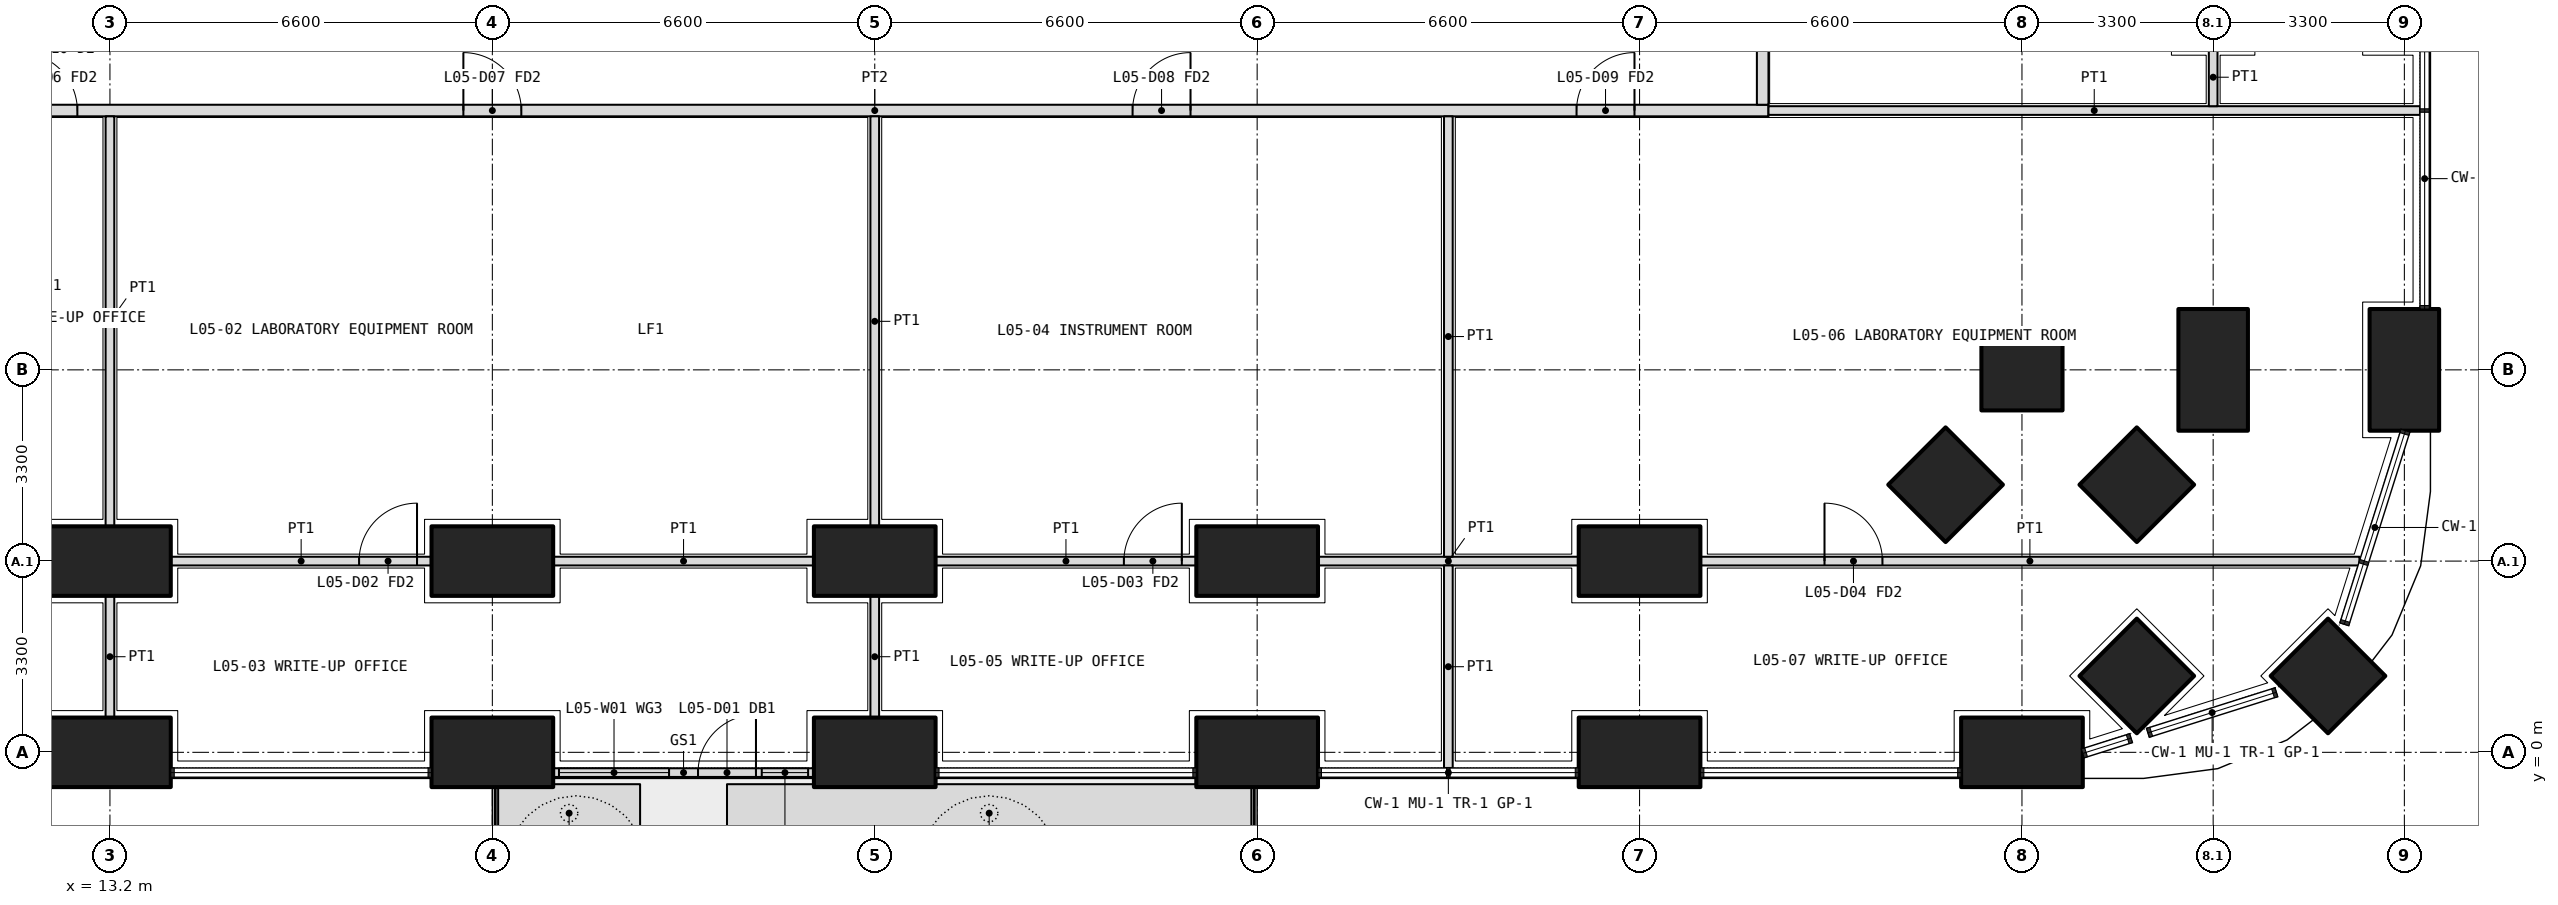
"""IFC4 building model, lengths in metres.
Left out: names, types, materials, properties, quantities, classifications, styles, units other than length and angle.
Written with IfcOpenShell. Run it as: python <this file> out.ifc"""

import sys

from ifc_helpers import new_model, si_unit, direction, frame, frame_2d, origin, origin_2d, place, context, subcontext, project, spatial, polyline, rectangle, outline, extrude, element, fill, save


model = new_model("IFC4")
c1 = context("Model", 3, precision=1e-05, world=origin(), true_north=direction((0.0, 1.0)))
c2 = subcontext(c1, "Body", "Model", "MODEL_VIEW")
j1 = project(units=[si_unit("LENGTHUNIT", "METRE"), si_unit("PLANEANGLEUNIT", "RADIAN")], contexts=[c1])
p1 = place(None, origin())
s1 = spatial("IfcSite", under=j1, at=p1, CompositionType="ELEMENT")
p2 = place(p1, origin())
s2 = spatial("IfcBuilding", under=s1, at=p2, CompositionType="ELEMENT")
p3 = place(p2, frame((0.0, 0.0, 25.5)))
s3 = spatial("IfcBuildingStorey", under=s2, at=p3, CompositionType="ELEMENT", Elevation=25.5)
p4 = place(p3, frame((51.482, 1.318, 0.0), z_axis=(0.0, 0.0, 1.0), x_axis=(0.707106781187, 0.707106781187, 0.0)))
e1 = element("IfcColumn", 1, at=p4, inside=s3, PredefinedType="COLUMN", context=c2, shape_type="SweptSolid", body=[
    extrude(rectangle(XDim=1.4, YDim=1.4, at=origin_2d()), origin(), (0.0, 0.0, 1.0), 4.2),
])
for number, where, z_axis, x_axis in (
    (2, (13.2, 0.0, 0.0), (0.0, 0.0, 1.0), (1.0, 0.0, 0.0)),
    (3, (19.8, 0.0, 0.0), (0.0, 0.0, 1.0), (1.0, 0.0, 0.0)),
    (4, (26.4, 0.0, 0.0), (0.0, 0.0, 1.0), (1.0, 0.0, 0.0)),
    (5, (33.0, 0.0, 0.0), (0.0, 0.0, 1.0), (1.0, 0.0, 0.0)),
    (6, (39.6, 0.0, 0.0), (0.0, 0.0, 1.0), (1.0, 0.0, 0.0)),
    (7, (46.2, 0.0, 0.0), (0.0, 0.0, 1.0), (1.0, 0.0, 0.0)),
    (8, (52.8, 6.6, 0.0), (0.0, 0.0, 1.0), (0.0, 1.0, 0.0)),
):
    element("IfcColumn", number, at=place(p3, frame(where, z_axis=z_axis, x_axis=x_axis)), inside=s3, PredefinedType="COLUMN", context=c2, shape_type="SweptSolid", body=[
        extrude(rectangle(XDim=2.1, YDim=1.2, at=origin_2d()), origin(), (0.0, 0.0, 1.0), 4.2),
    ])
for number, where, z_axis, x_axis in (
    (9, (46.2, 6.6, 0.0), (0.0, 0.0, 1.0), (1.0, 0.0, 0.0)),
    (10, (48.182, 1.318, 0.0), (0.0, 0.0, 1.0), (0.707, 0.707, 0.0)),
):
    element("IfcColumn", number, at=place(p3, frame(where, z_axis=z_axis, x_axis=x_axis)), inside=s3, PredefinedType="COLUMN", context=c2, shape_type="SweptSolid", body=[
        extrude(rectangle(XDim=1.4, YDim=1.4, at=origin_2d()), origin(), (0.0, 0.0, 1.0), 4.2),
    ])
p5 = place(p3, frame((49.5, 6.6, 0.0), z_axis=(0.0, 0.0, 1.0), x_axis=(0.0, 1.0, 0.0)))
e11 = element("IfcColumn", 11, at=p5, inside=s3, PredefinedType="COLUMN", context=c2, shape_type="SweptSolid", body=[
    extrude(rectangle(XDim=2.1, YDim=1.2, at=origin_2d()), origin(), (0.0, 0.0, 1.0), 4.2),
])
p6 = place(p3, frame((48.182, 4.618, 0.0), z_axis=(0.0, 0.0, 1.0), x_axis=(0.707106781187, 0.707106781187, 0.0)))
e12 = element("IfcColumn", 12, at=p6, inside=s3, PredefinedType="COLUMN", context=c2, shape_type="SweptSolid", body=[
    extrude(rectangle(XDim=1.4, YDim=1.4, at=origin_2d()), origin(), (0.0, 0.0, 1.0), 4.2),
])
for number, where, z_axis, x_axis in (
    (13, (13.2, 3.3, 0.0), (0.0, 0.0, 1.0), (1.0, 0.0, 0.0)),
    (14, (19.8, 3.3, 0.0), (0.0, 0.0, 1.0), (1.0, 0.0, 0.0)),
    (15, (26.4, 3.3, 0.0), (0.0, 0.0, 1.0), (1.0, 0.0, 0.0)),
    (16, (33.0, 3.3, 0.0), (0.0, 0.0, 1.0), (1.0, 0.0, 0.0)),
    (17, (39.6, 3.3, 0.0), (0.0, 0.0, 1.0), (1.0, 0.0, 0.0)),
):
    element("IfcColumn", number, at=place(p3, frame(where, z_axis=z_axis, x_axis=x_axis)), inside=s3, PredefinedType="COLUMN", context=c2, shape_type="SweptSolid", body=[
        extrude(rectangle(XDim=2.1, YDim=1.2, at=origin_2d()), origin(), (0.0, 0.0, 1.0), 4.2),
    ])
p7 = place(p3, frame((44.882, 4.618, 0.0), z_axis=(0.0, 0.0, 1.0), x_axis=(0.707106781187, 0.707106781187, 0.0)))
e18 = element("IfcColumn", 18, at=p7, inside=s3, PredefinedType="COLUMN", context=c2, shape_type="SweptSolid", body=[
    extrude(rectangle(XDim=1.4, YDim=1.4, at=origin_2d()), origin(), (0.0, 0.0, 1.0), 4.2),
])
p8 = place(p3, origin())
e19 = element("IfcWall", 19, at=p8, inside=s3, PredefinedType="USERDEFINED", context=c2, shape_type="SweptSolid", body=[
    extrude(outline(polyline([(19.9, -1.55), (22.35, -1.55), (22.35, -0.55), (19.9, -0.55), (19.9, -1.55)]), holes=[polyline([(20.05, -1.4), (22.2, -1.4), (22.2, -0.7), (20.05, -0.7), (20.05, -1.4)])]), origin(), (0.0, 0.0, 1.0), 1.05),
])
p9 = place(p3, origin())
e20 = element("IfcWall", 20, at=p9, inside=s3, PredefinedType="USERDEFINED", context=c2, shape_type="SweptSolid", body=[
    extrude(outline(polyline([(23.85, -1.55), (32.9, -1.55), (32.9, -0.55), (23.85, -0.55), (23.85, -1.55)]), holes=[polyline([(24.0, -1.4), (32.75, -1.4), (32.75, -0.7), (24.0, -0.7), (24.0, -1.4)])]), origin(), (0.0, 0.0, 1.0), 1.05),
])
p10 = place(p3, frame((20.85, -0.35, 0.0), z_axis=(0.0, 0.0, 1.0), x_axis=(1.0, 0.0, 0.0)))
e21 = element("IfcWall", 21, at=p10, inside=s3, PredefinedType="SOLIDWALL", context=c2, shape_type="SweptSolid", body=[
    extrude(rectangle(XDim=4.5, YDim=0.15, at=frame_2d((2.25, 0.0))), origin(), (0.0, 0.0, 1.0), 2.7),
])
p11 = place(p10, frame((2.5, 0.0, 0.0)))
e22 = element("IfcOpeningElement", 22, at=p11, cuts=e21, PredefinedType="OPENING", context=c2, shape_type="SweptSolid", body=[
    extrude(rectangle(XDim=1.0, YDim=2.4, at=frame_2d((0.5, 1.2))), frame((0.0, 0.085, 0.0), z_axis=(0.0, -1.0, 0.0), x_axis=(1.0, 0.0, 0.0)), (0.0, 0.0, 1.0), 0.17),
])
p12 = place(p10, frame((0.1, 0.0, 0.1)))
e23 = element("IfcOpeningElement", 23, at=p12, cuts=e21, PredefinedType="OPENING", context=c2, shape_type="SweptSolid", body=[
    extrude(rectangle(XDim=1.9, YDim=2.3, at=frame_2d((0.95, 1.15))), frame((0.0, 0.085, 0.0), z_axis=(0.0, -1.0, 0.0), x_axis=(1.0, 0.0, 0.0)), (0.0, 0.0, 1.0), 0.17),
])
p13 = place(p10, frame((3.6, 0.0, 0.1)))
e24 = element("IfcOpeningElement", 24, at=p13, cuts=e21, PredefinedType="OPENING", context=c2, shape_type="SweptSolid", body=[
    extrude(rectangle(XDim=0.8, YDim=2.3, at=frame_2d((0.4, 1.15))), frame((0.0, 0.085, 0.0), z_axis=(0.0, -1.0, 0.0), x_axis=(1.0, 0.0, 0.0)), (0.0, 0.0, 1.0), 0.17),
])
p14 = place(p3, frame((10.975, 11.075, 0.0), z_axis=(0.0, 0.0, 1.0), x_axis=(1.0, 0.0, 0.0)))
e25 = element("IfcWall", 25, at=p14, inside=s3, PredefinedType="PARTITIONING", context=c2, shape_type="SweptSolid", body=[
    extrude(rectangle(XDim=30.85, YDim=0.2, at=frame_2d((15.425, 0.0))), origin(), (0.0, 0.0, 1.0), 2.85),
])
p15 = place(p14, frame((0.663, 0.0, 0.0)))
e26 = element("IfcOpeningElement", 26, at=p15, cuts=e25, PredefinedType="OPENING", context=c2, shape_type="SweptSolid", body=[
    extrude(rectangle(XDim=1.0, YDim=2.1, at=frame_2d((0.5, 1.05))), frame((0.0, 0.11, 0.0), z_axis=(0.0, -1.0, 0.0), x_axis=(1.0, 0.0, 0.0)), (0.0, 0.0, 1.0), 0.22),
])
p16 = place(p14, frame((8.325, 0.0, 0.0)))
e27 = element("IfcOpeningElement", 27, at=p16, cuts=e25, PredefinedType="OPENING", context=c2, shape_type="SweptSolid", body=[
    extrude(rectangle(XDim=1.0, YDim=2.1, at=frame_2d((0.5, 1.05))), frame((0.0, 0.11, 0.0), z_axis=(0.0, -1.0, 0.0), x_axis=(1.0, 0.0, 0.0)), (0.0, 0.0, 1.0), 0.22),
])
p17 = place(p14, frame((19.875, 0.0, 0.0)))
e28 = element("IfcOpeningElement", 28, at=p17, cuts=e25, PredefinedType="OPENING", context=c2, shape_type="SweptSolid", body=[
    extrude(rectangle(XDim=1.0, YDim=2.1, at=frame_2d((0.5, 1.05))), frame((0.0, 0.11, 0.0), z_axis=(0.0, -1.0, 0.0), x_axis=(1.0, 0.0, 0.0)), (0.0, 0.0, 1.0), 0.22),
])
p18 = place(p14, frame((27.538, 0.0, 0.0)))
e29 = element("IfcOpeningElement", 29, at=p18, cuts=e25, PredefinedType="OPENING", context=c2, shape_type="SweptSolid", body=[
    extrude(rectangle(XDim=1.0, YDim=2.1, at=frame_2d((0.5, 1.05))), frame((0.0, 0.11, 0.0), z_axis=(0.0, -1.0, 0.0), x_axis=(1.0, 0.0, 0.0)), (0.0, 0.0, 1.0), 0.22),
])
p19 = place(p3, frame((41.725, 11.175, 0.0), z_axis=(0.0, 0.0, 1.0), x_axis=(0.0, 1.0, 0.0)))
e30 = element("IfcWall", 30, at=p19, inside=s3, PredefinedType="PARTITIONING", context=c2, shape_type="SweptSolid", body=[
    extrude(rectangle(XDim=18.525, YDim=0.2, at=frame_2d((9.262, 0.0))), origin(), (0.0, 0.0, 1.0), 2.85),
])
p20 = place(p19, frame((3.663, 0.0, 0.0)))
e31 = element("IfcOpeningElement", 31, at=p20, cuts=e30, PredefinedType="OPENING", context=c2, shape_type="SweptSolid", body=[
    extrude(rectangle(XDim=1.2, YDim=2.1, at=frame_2d((0.6, 1.05))), frame((0.0, 0.11, 0.0), z_axis=(0.0, -1.0, 0.0), x_axis=(1.0, 0.0, 0.0)), (0.0, 0.0, 1.0), 0.22),
])
p21 = place(p19, frame((9.725, 0.0, 0.0)))
e32 = element("IfcOpeningElement", 32, at=p21, cuts=e30, PredefinedType="OPENING", context=c2, shape_type="SweptSolid", body=[
    extrude(rectangle(XDim=1.0, YDim=2.1, at=frame_2d((0.5, 1.05))), frame((0.0, 0.11, 0.0), z_axis=(0.0, -1.0, 0.0), x_axis=(1.0, 0.0, 0.0)), (0.0, 0.0, 1.0), 0.22),
])
p22 = place(p19, frame((13.075, 0.0, 0.0)))
e33 = element("IfcOpeningElement", 33, at=p22, cuts=e30, PredefinedType="OPENING", context=c2, shape_type="SweptSolid", body=[
    extrude(rectangle(XDim=0.9, YDim=2.1, at=frame_2d((0.45, 1.05))), frame((0.0, 0.11, 0.0), z_axis=(0.0, -1.0, 0.0), x_axis=(1.0, 0.0, 0.0)), (0.0, 0.0, 1.0), 0.22),
])
p23 = place(p19, frame((16.275, 0.0, 0.0)))
e34 = element("IfcOpeningElement", 34, at=p23, cuts=e30, PredefinedType="OPENING", context=c2, shape_type="SweptSolid", body=[
    extrude(rectangle(XDim=1.2, YDim=2.1, at=frame_2d((0.6, 1.05))), frame((0.0, 0.11, 0.0), z_axis=(0.0, -1.0, 0.0), x_axis=(1.0, 0.0, 0.0)), (0.0, 0.0, 1.0), 0.22),
])
p24 = place(p3, frame((53.07, 11.075, 0.0), z_axis=(0.0, 0.0, 1.0), x_axis=(-1.0, 0.0, 0.0)))
e35 = element("IfcWall", 35, at=p24, inside=s3, PredefinedType="PARTITIONING", context=c2, shape_type="SweptSolid", body=[
    extrude(rectangle(XDim=11.245, YDim=0.15, at=frame_2d((5.623, 0.0))), origin(), (0.0, 0.0, 1.0), 2.7),
])
p25 = place(p3, frame((14.25, 3.3, 0.0), z_axis=(0.0, 0.0, 1.0), x_axis=(1.0, 0.0, 0.0)))
e36 = element("IfcWall", 36, at=p25, inside=s3, PredefinedType="PARTITIONING", context=c2, shape_type="SweptSolid", body=[
    extrude(rectangle(XDim=4.5, YDim=0.15, at=frame_2d((2.25, 0.0))), origin(), (0.0, 0.0, 1.0), 3.9),
])
p26 = place(p25, frame((3.25, 0.0, 0.0)))
e37 = element("IfcOpeningElement", 37, at=p26, cuts=e36, PredefinedType="OPENING", context=c2, shape_type="SweptSolid", body=[
    extrude(rectangle(XDim=1.0, YDim=2.1, at=frame_2d((0.5, 1.05))), frame((0.0, 0.085, 0.0), z_axis=(0.0, -1.0, 0.0), x_axis=(1.0, 0.0, 0.0)), (0.0, 0.0, 1.0), 0.17),
])
p27 = place(p3, frame((20.85, 3.3, 0.0), z_axis=(0.0, 0.0, 1.0), x_axis=(1.0, 0.0, 0.0)))
e38 = element("IfcWall", 38, at=p27, inside=s3, PredefinedType="PARTITIONING", context=c2, shape_type="SweptSolid", body=[
    extrude(rectangle(XDim=4.5, YDim=0.15, at=frame_2d((2.25, 0.0))), origin(), (0.0, 0.0, 1.0), 3.9),
])
p28 = place(p3, frame((27.45, 3.3, 0.0), z_axis=(0.0, 0.0, 1.0), x_axis=(1.0, 0.0, 0.0)))
e39 = element("IfcWall", 39, at=p28, inside=s3, PredefinedType="PARTITIONING", context=c2, shape_type="SweptSolid", body=[
    extrude(rectangle(XDim=4.5, YDim=0.15, at=frame_2d((2.25, 0.0))), origin(), (0.0, 0.0, 1.0), 3.9),
])
p29 = place(p28, frame((3.25, 0.0, 0.0)))
e40 = element("IfcOpeningElement", 40, at=p29, cuts=e39, PredefinedType="OPENING", context=c2, shape_type="SweptSolid", body=[
    extrude(rectangle(XDim=1.0, YDim=2.1, at=frame_2d((0.5, 1.05))), frame((0.0, 0.085, 0.0), z_axis=(0.0, -1.0, 0.0), x_axis=(1.0, 0.0, 0.0)), (0.0, 0.0, 1.0), 0.17),
])
p30 = place(p3, frame((34.05, 3.3, 0.0), z_axis=(0.0, 0.0, 1.0), x_axis=(1.0, 0.0, 0.0)))
e41 = element("IfcWall", 41, at=p30, inside=s3, PredefinedType="PARTITIONING", context=c2, shape_type="SweptSolid", body=[
    extrude(rectangle(XDim=4.5, YDim=0.15, at=frame_2d((2.25, 0.0))), origin(), (0.0, 0.0, 1.0), 3.9),
])
p31 = place(p3, frame((40.65, 3.3, 0.0), z_axis=(0.0, 0.0, 1.0), x_axis=(1.0, 0.0, 0.0)))
e42 = element("IfcWall", 42, at=p31, inside=s3, PredefinedType="PARTITIONING", context=c2, shape_type="SweptSolid", body=[
    extrude(rectangle(XDim=11.374, YDim=0.15, at=frame_2d((5.687, 0.0))), origin(), (0.0, 0.0, 1.0), 2.7),
])
p32 = place(p31, frame((2.142, 0.0, 0.0)))
e43 = element("IfcOpeningElement", 43, at=p32, cuts=e42, PredefinedType="OPENING", context=c2, shape_type="SweptSolid", body=[
    extrude(rectangle(XDim=1.0, YDim=2.1, at=frame_2d((0.5, 1.05))), frame((0.0, 0.085, 0.0), z_axis=(0.0, -1.0, 0.0), x_axis=(1.0, 0.0, 0.0)), (0.0, 0.0, 1.0), 0.17),
])
p33 = place(p3, frame((13.2, 0.6, 0.0), z_axis=(0.0, 0.0, 1.0), x_axis=(0.0, 1.0, 0.0)))
e44 = element("IfcWall", 44, at=p33, inside=s3, PredefinedType="PARTITIONING", context=c2, shape_type="SweptSolid", body=[
    extrude(rectangle(XDim=2.1, YDim=0.15, at=frame_2d((1.05, 0.0))), origin(), (0.0, 0.0, 1.0), 2.85),
])
p34 = place(p3, frame((13.2, 3.9, 0.0), z_axis=(0.0, 0.0, 1.0), x_axis=(0.0, 1.0, 0.0)))
e45 = element("IfcWall", 45, at=p34, inside=s3, PredefinedType="PARTITIONING", context=c2, shape_type="SweptSolid", body=[
    extrude(rectangle(XDim=7.075, YDim=0.15, at=frame_2d((3.538, 0.0))), origin(), (0.0, 0.0, 1.0), 2.85),
])
p35 = place(p3, frame((26.4, 0.6, 0.0), z_axis=(0.0, 0.0, 1.0), x_axis=(0.0, 1.0, 0.0)))
e46 = element("IfcWall", 46, at=p35, inside=s3, PredefinedType="PARTITIONING", context=c2, shape_type="SweptSolid", body=[
    extrude(rectangle(XDim=2.1, YDim=0.15, at=frame_2d((1.05, 0.0))), origin(), (0.0, 0.0, 1.0), 2.85),
])
p36 = place(p3, frame((26.4, 3.9, 0.0), z_axis=(0.0, 0.0, 1.0), x_axis=(0.0, 1.0, 0.0)))
e47 = element("IfcWall", 47, at=p36, inside=s3, PredefinedType="PARTITIONING", context=c2, shape_type="SweptSolid", body=[
    extrude(rectangle(XDim=7.075, YDim=0.15, at=frame_2d((3.538, 0.0))), origin(), (0.0, 0.0, 1.0), 2.85),
])
p37 = place(p3, frame((36.3, -0.27, 0.0), z_axis=(0.0, 0.0, 1.0), x_axis=(0.0, 1.0, 0.0)))
e48 = element("IfcWall", 48, at=p37, inside=s3, PredefinedType="PARTITIONING", context=c2, shape_type="SweptSolid", body=[
    extrude(rectangle(XDim=3.495, YDim=0.15, at=frame_2d((1.748, 0.0))), origin(), (0.0, 0.0, 1.0), 2.7),
])
p38 = place(p3, frame((36.3, 3.375, 0.0), z_axis=(0.0, 0.0, 1.0), x_axis=(0.0, 1.0, 0.0)))
e49 = element("IfcWall", 49, at=p38, inside=s3, PredefinedType="PARTITIONING", context=c2, shape_type="SweptSolid", body=[
    extrude(rectangle(XDim=7.6, YDim=0.15, at=frame_2d((3.8, 0.0))), origin(), (0.0, 0.0, 1.0), 3.9),
])
p39 = place(p3, frame((49.5, 11.15, 0.0), z_axis=(0.0, 0.0, 1.0), x_axis=(0.0, 1.0, 0.0)))
e50 = element("IfcWall", 50, at=p39, inside=s3, PredefinedType="PARTITIONING", context=c2, shape_type="SweptSolid", body=[
    extrude(rectangle(XDim=1.0, YDim=0.15, at=frame_2d((0.5, 0.0))), origin(), (0.0, 0.0, 1.0), 3.9),
])
p40 = place(p11, origin())
e51 = element("IfcDoor", 51, at=p40, inside=s3, OperationType="SINGLE_SWING_RIGHT", PredefinedType="DOOR", context=c2, shape_type="SweptSolid", body=[
    extrude(rectangle(XDim=1.0, YDim=2.4, at=frame_2d((0.5, 1.2))), frame((0.0, 0.025, 0.0), z_axis=(0.0, -1.0, 0.0), x_axis=(1.0, 0.0, 0.0)), (0.0, 0.0, 1.0), 0.05),
])
fill(e22, e51)
p41 = place(p12, origin())
e52 = element("IfcWindow", 52, at=p41, inside=s3, PartitioningType="SINGLE_PANEL", PredefinedType="WINDOW", context=c2, shape_type="SweptSolid", body=[
    extrude(rectangle(XDim=1.9, YDim=2.3, at=frame_2d((0.95, 1.15))), frame((0.0, 0.03, 0.0), z_axis=(0.0, -1.0, 0.0), x_axis=(1.0, 0.0, 0.0)), (0.0, 0.0, 1.0), 0.06),
])
fill(e23, e52)
p42 = place(p13, origin())
e53 = element("IfcWindow", 53, at=p42, inside=s3, PartitioningType="SINGLE_PANEL", PredefinedType="WINDOW", context=c2, shape_type="SweptSolid", body=[
    extrude(rectangle(XDim=0.8, YDim=2.3, at=frame_2d((0.4, 1.15))), frame((0.0, 0.03, 0.0), z_axis=(0.0, -1.0, 0.0), x_axis=(1.0, 0.0, 0.0)), (0.0, 0.0, 1.0), 0.06),
])
fill(e24, e53)
p43 = place(p15, origin())
e54 = element("IfcDoor", 54, at=p43, inside=s3, OperationType="SINGLE_SWING_LEFT", PredefinedType="DOOR", context=c2, shape_type="SweptSolid", body=[
    extrude(rectangle(XDim=1.0, YDim=2.1, at=frame_2d((0.5, 1.05))), frame((0.0, 0.025, 0.0), z_axis=(0.0, -1.0, 0.0), x_axis=(1.0, 0.0, 0.0)), (0.0, 0.0, 1.0), 0.05),
])
fill(e26, e54)
p44 = place(p16, origin())
e55 = element("IfcDoor", 55, at=p44, inside=s3, OperationType="SINGLE_SWING_LEFT", PredefinedType="DOOR", context=c2, shape_type="SweptSolid", body=[
    extrude(rectangle(XDim=1.0, YDim=2.1, at=frame_2d((0.5, 1.05))), frame((0.0, 0.025, 0.0), z_axis=(0.0, -1.0, 0.0), x_axis=(1.0, 0.0, 0.0)), (0.0, 0.0, 1.0), 0.05),
])
fill(e27, e55)
p45 = place(p26, origin())
e56 = element("IfcDoor", 56, at=p45, inside=s3, OperationType="SINGLE_SWING_RIGHT", PredefinedType="DOOR", context=c2, shape_type="SweptSolid", body=[
    extrude(rectangle(XDim=1.0, YDim=2.1, at=frame_2d((0.5, 1.05))), frame((0.0, 0.025, 0.0), z_axis=(0.0, -1.0, 0.0), x_axis=(1.0, 0.0, 0.0)), (0.0, 0.0, 1.0), 0.05),
])
fill(e37, e56)
p46 = place(p17, origin())
e57 = element("IfcDoor", 57, at=p46, inside=s3, OperationType="SINGLE_SWING_RIGHT", PredefinedType="DOOR", context=c2, shape_type="SweptSolid", body=[
    extrude(rectangle(XDim=1.0, YDim=2.1, at=frame_2d((0.5, 1.05))), frame((0.0, 0.025, 0.0), z_axis=(0.0, -1.0, 0.0), x_axis=(1.0, 0.0, 0.0)), (0.0, 0.0, 1.0), 0.05),
])
fill(e28, e57)
p47 = place(p29, origin())
e58 = element("IfcDoor", 58, at=p47, inside=s3, OperationType="SINGLE_SWING_RIGHT", PredefinedType="DOOR", context=c2, shape_type="SweptSolid", body=[
    extrude(rectangle(XDim=1.0, YDim=2.1, at=frame_2d((0.5, 1.05))), frame((0.0, 0.025, 0.0), z_axis=(0.0, -1.0, 0.0), x_axis=(1.0, 0.0, 0.0)), (0.0, 0.0, 1.0), 0.05),
])
fill(e40, e58)
p48 = place(p18, origin())
e59 = element("IfcDoor", 59, at=p48, inside=s3, OperationType="SINGLE_SWING_RIGHT", PredefinedType="DOOR", context=c2, shape_type="SweptSolid", body=[
    extrude(rectangle(XDim=1.0, YDim=2.1, at=frame_2d((0.5, 1.05))), frame((0.0, 0.025, 0.0), z_axis=(0.0, -1.0, 0.0), x_axis=(1.0, 0.0, 0.0)), (0.0, 0.0, 1.0), 0.05),
])
fill(e29, e59)
p49 = place(p32, origin())
e60 = element("IfcDoor", 60, at=p49, inside=s3, OperationType="SINGLE_SWING_LEFT", PredefinedType="DOOR", context=c2, shape_type="SweptSolid", body=[
    extrude(rectangle(XDim=1.0, YDim=2.1, at=frame_2d((0.5, 1.05))), frame((0.0, 0.025, 0.0), z_axis=(0.0, -1.0, 0.0), x_axis=(1.0, 0.0, 0.0)), (0.0, 0.0, 1.0), 0.05),
])
fill(e43, e60)
save(model, sys.argv[1])
